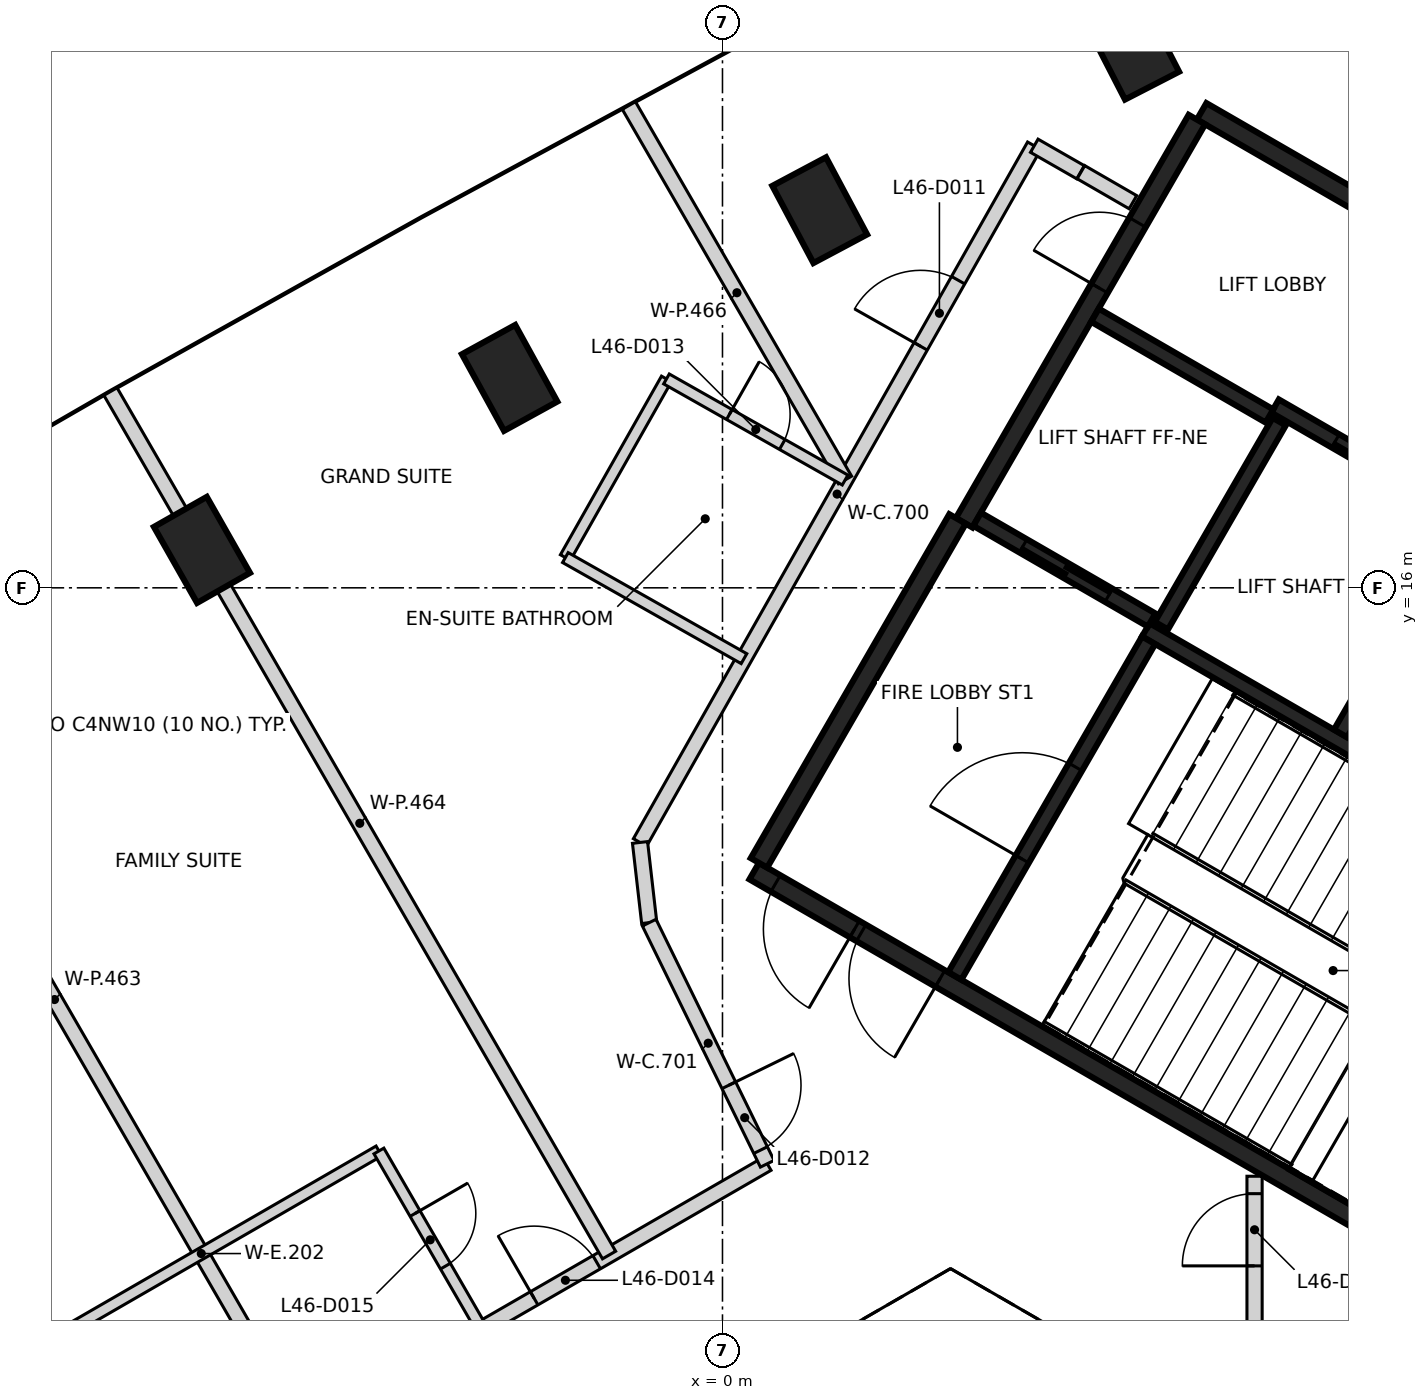
"""IFC4 building model, lengths in metres.
Left out: names, types, materials, properties, quantities, classifications, styles, units other than length and angle.
Written with IfcOpenShell. Run it as: python <this file> out.ifc"""

import sys

from ifc_helpers import new_model, si_unit, direction, frame, frame_2d, origin, origin_2d, place, context, subcontext, project, spatial, rectangle, extrude, element, fill, save


model = new_model("IFC4")
c1 = context("Model", 3, precision=1e-05, world=origin(), true_north=direction((0.0, 1.0)))
c2 = subcontext(c1, "Body", "Model", "MODEL_VIEW")
j1 = project(units=[si_unit("LENGTHUNIT", "METRE"), si_unit("PLANEANGLEUNIT", "RADIAN")], contexts=[c1])
p1 = place(None, origin())
s1 = spatial("IfcSite", under=j1, at=p1, CompositionType="ELEMENT")
p2 = place(p1, origin())
s2 = spatial("IfcBuilding", under=s1, at=p2, CompositionType="ELEMENT")
p3 = place(p2, frame((0.0, 0.0, 186.4)))
s3 = spatial("IfcBuildingStorey", under=s2, at=p3, CompositionType="ELEMENT", Elevation=186.4)
for number, where, z_axis, x_axis in (
    (1, (5.388, 23.118, -0.35), (0.0, 0.0, 1.0), (-0.458, 0.889, 0.0)),
    (2, (1.279, 20.968, -0.35), (0.0, 0.0, 1.0), (-0.47, 0.883, 0.0)),
    (3, (-2.8, 18.762, -0.35), (0.0, 0.0, 1.0), (-0.482, 0.876, 0.0)),
    (4, (-6.848, 16.499, -0.35), (0.0, 0.0, 1.0), (-0.494, 0.87, 0.0)),
):
    element("IfcColumn", number, at=place(p3, frame(where, z_axis=z_axis, x_axis=x_axis)), inside=s3, PredefinedType="COLUMN", context=c2, shape_type="SweptSolid", body=[
        extrude(rectangle(XDim=1.15, YDim=0.8, at=origin_2d()), origin(), (0.0, 0.0, 1.0), 3.6),
    ])
p4 = place(p3, frame((10.42, 6.498, 0.0), z_axis=(0.0, 0.0, 1.0), x_axis=(-0.866021906294, 0.500006057782, 0.0)))
e5 = element("IfcWall", 5, at=p4, inside=s3, PredefinedType="SHEAR", context=c2, shape_type="SweptSolid", body=[
    extrude(rectangle(XDim=11.55, YDim=0.25, at=frame_2d((5.775, 0.0))), origin(), (0.0, 0.0, 1.0), 3.25),
])
p5 = place(p4, frame((10.025, 0.0, 0.0)))
e6 = element("IfcOpeningElement", 6, at=p5, cuts=e5, PredefinedType="OPENING", context=c2, shape_type="SweptSolid", body=[
    extrude(rectangle(XDim=1.2, YDim=2.1, at=frame_2d((0.6, 1.05))), frame((0.0, 0.135, 0.0), z_axis=(0.0, -1.0, 0.0), x_axis=(1.0, 0.0, 0.0)), (0.0, 0.0, 1.0), 0.27),
])
p6 = place(p4, frame((8.725, 0.0, 0.0)))
e7 = element("IfcOpeningElement", 7, at=p6, cuts=e5, PredefinedType="OPENING", context=c2, shape_type="SweptSolid", body=[
    extrude(rectangle(XDim=1.2, YDim=2.1, at=frame_2d((0.6, 1.05))), frame((0.0, 0.135, 0.0), z_axis=(0.0, -1.0, 0.0), x_axis=(1.0, 0.0, 0.0)), (0.0, 0.0, 1.0), 0.27),
])
p7 = place(p3, frame((6.304, 22.269, 0.0), z_axis=(0.0, 0.0, 1.0), x_axis=(0.866022959057, -0.500004234368, 0.0)))
e8 = element("IfcWall", 8, at=p7, inside=s3, PredefinedType="SHEAR", context=c2, shape_type="SweptSolid", body=[
    extrude(rectangle(XDim=8.75, YDim=0.25, at=frame_2d((4.375, 0.0))), origin(), (0.0, 0.0, 1.0), 3.25),
])
p8 = place(p3, frame((3.179, 16.856, 0.0), z_axis=(0.0, 0.0, 1.0), x_axis=(0.500001955336, 0.866024274868, 0.0)))
e9 = element("IfcWall", 9, at=p8, inside=s3, PredefinedType="SHEAR", context=c2, shape_type="SweptSolid", body=[
    extrude(rectangle(XDim=6.125, YDim=0.25, at=frame_2d((3.062, 0.0))), origin(), (0.0, 0.0, 1.0), 3.25),
])
p9 = place(p8, frame((3.563, 0.0, 0.0)))
e10 = element("IfcOpeningElement", 10, at=p9, cuts=e9, PredefinedType="OPENING", context=c2, shape_type="SweptSolid", body=[
    extrude(rectangle(XDim=1.0, YDim=2.1, at=frame_2d((0.5, 1.05))), frame((0.0, 0.135, 0.0), z_axis=(0.0, -1.0, 0.0), x_axis=(1.0, 0.0, 0.0)), (0.0, 0.0, 1.0), 0.27),
])
p10 = place(p3, frame((0.48, 12.381, 0.0), z_axis=(0.0, 0.0, 1.0), x_axis=(0.49999885962, 0.866026062182, 0.0)))
e11 = element("IfcWall", 11, at=p10, inside=s3, PredefinedType="SHEAR", context=c2, shape_type="SweptSolid", body=[
    extrude(rectangle(XDim=5.225, YDim=0.25, at=frame_2d((2.612, 0.0))), origin(), (0.0, 0.0, 1.0), 3.25),
])
p11 = place(p3, frame((12.552, 15.342, 0.0), z_axis=(0.0, 0.0, 1.0), x_axis=(-0.866030299012, 0.499991521122, 0.0)))
e12 = element("IfcWall", 12, at=p11, inside=s3, PredefinedType="SHEAR", context=c2, shape_type="SweptSolid", body=[
    extrude(rectangle(XDim=6.1, YDim=0.2, at=frame_2d((3.05, 0.0))), origin(), (0.0, 0.0, 1.0), 3.25),
])
p12 = place(p11, frame((1.0, 0.0, 0.0)))
e13 = element("IfcOpeningElement", 13, at=p12, cuts=e12, PredefinedType="OPENING", context=c2, shape_type="SweptSolid", body=[
    extrude(rectangle(XDim=1.2, YDim=2.1, at=frame_2d((0.6, 1.05))), frame((0.0, 0.11, 0.0), z_axis=(0.0, -1.0, 0.0), x_axis=(1.0, 0.0, 0.0)), (0.0, 0.0, 1.0), 0.22),
])
p13 = place(p11, frame((3.982, 0.0, 0.0)))
e14 = element("IfcOpeningElement", 14, at=p13, cuts=e12, PredefinedType="OPENING", context=c2, shape_type="SweptSolid", body=[
    extrude(rectangle(XDim=1.2, YDim=2.1, at=frame_2d((0.6, 1.05))), frame((0.0, 0.11, 0.0), z_axis=(0.0, -1.0, 0.0), x_axis=(1.0, 0.0, 0.0)), (0.0, 0.0, 1.0), 0.22),
])
p14 = place(p3, frame((10.743, 12.46, 0.0), z_axis=(0.0, 0.0, 1.0), x_axis=(-0.866018848283, 0.500011354289, 0.0)))
e15 = element("IfcWall", 15, at=p14, inside=s3, PredefinedType="SHEAR", context=c2, shape_type="SweptSolid", body=[
    extrude(rectangle(XDim=5.974, YDim=0.2, at=frame_2d((2.987, 0.0))), origin(), (0.0, 0.0, 1.0), 3.25),
])
p15 = place(p3, frame((3.057, 10.895, 0.0), z_axis=(0.0, 0.0, 1.0), x_axis=(0.500027839223, 0.866009330205, 0.0)))
e16 = element("IfcWall", 16, at=p15, inside=s3, PredefinedType="SHEAR", context=c2, shape_type="SweptSolid", body=[
    extrude(rectangle(XDim=5.098, YDim=0.2, at=frame_2d((2.549, 0.0))), origin(), (0.0, 0.0, 1.0), 3.25),
])
p16 = place(p15, frame((1.774, 0.0, 0.0)))
e17 = element("IfcOpeningElement", 17, at=p16, cuts=e16, PredefinedType="OPENING", context=c2, shape_type="SweptSolid", body=[
    extrude(rectangle(XDim=1.4, YDim=2.1, at=frame_2d((0.7, 1.05))), frame((0.0, 0.11, 0.0), z_axis=(0.0, -1.0, 0.0), x_axis=(1.0, 0.0, 0.0)), (0.0, 0.0, 1.0), 0.22),
])
p17 = place(p3, frame((8.132, 14.084, 0.0), z_axis=(0.0, 0.0, 1.0), x_axis=(0.500030834389, 0.86600760081, 0.0)))
e18 = element("IfcWall", 18, at=p17, inside=s3, PredefinedType="SHEAR", context=c2, shape_type="SweptSolid", body=[
    extrude(rectangle(XDim=3.198, YDim=0.2, at=frame_2d((1.599, 0.0))), origin(), (0.0, 0.0, 1.0), 3.25),
])
p18 = place(p3, frame((7.324, 18.187, 0.0), z_axis=(0.0, 0.0, 1.0), x_axis=(-0.499967891604, -0.866043940782, 0.0)))
e19 = element("IfcWall", 19, at=p18, inside=s3, PredefinedType="SHEAR", context=c2, shape_type="SweptSolid", body=[
    extrude(rectangle(XDim=3.1, YDim=0.2, at=frame_2d((1.55, 0.0))), origin(), (0.0, 0.0, 1.0), 3.25),
])
p19 = place(p3, frame((5.646, 15.576, 0.0), z_axis=(0.0, 0.0, 1.0), x_axis=(-0.866018407898, 0.500012117035, 0.0)))
e20 = element("IfcWall", 20, at=p19, inside=s3, PredefinedType="SHEAR", context=c2, shape_type="SweptSolid", body=[
    extrude(rectangle(XDim=2.651, YDim=0.2, at=frame_2d((1.325, 0.0))), origin(), (0.0, 0.0, 1.0), 3.25),
])
p20 = place(p19, frame((0.652, 0.0, 0.0)))
e21 = element("IfcOpeningElement", 21, at=p20, cuts=e20, PredefinedType="OPENING", context=c2, shape_type="SweptSolid", body=[
    extrude(rectangle(XDim=1.3, YDim=2.1, at=frame_2d((0.65, 1.05))), frame((0.0, 0.11, 0.0), z_axis=(0.0, -1.0, 0.0), x_axis=(1.0, 0.0, 0.0)), (0.0, 0.0, 1.0), 0.22),
])
p21 = place(p3, frame((7.196, 18.26, 0.0), z_axis=(0.0, 0.0, 1.0), x_axis=(-0.866018407898, 0.500012117035, 0.0)))
e22 = element("IfcWall", 22, at=p21, inside=s3, PredefinedType="SHEAR", context=c2, shape_type="SweptSolid", body=[
    extrude(rectangle(XDim=2.651, YDim=0.2, at=frame_2d((1.325, 0.0))), origin(), (0.0, 0.0, 1.0), 3.25),
])
p22 = place(p3, frame((-10.652, 1.934, 0.0), z_axis=(0.0, 0.0, 1.0), x_axis=(0.866066882415, 0.499928150021, 0.0)))
e23 = element("IfcWall", 23, at=p22, inside=s3, PredefinedType="PARTITIONING", context=c2, shape_type="SweptSolid", body=[
    extrude(rectangle(XDim=12.98, YDim=0.2, at=frame_2d((6.49, 0.0))), origin(), (0.0, 0.0, 1.0), 3.25),
])
p23 = place(p22, frame((9.439, 0.0, 0.0)))
e24 = element("IfcOpeningElement", 24, at=p23, cuts=e23, PredefinedType="OPENING", context=c2, shape_type="SweptSolid", body=[
    extrude(rectangle(XDim=0.95, YDim=2.1, at=frame_2d((0.475, 1.05))), frame((0.0, 0.11, 0.0), z_axis=(0.0, -1.0, 0.0), x_axis=(1.0, 0.0, 0.0)), (0.0, 0.0, 1.0), 0.22),
])
p24 = place(p22, frame((0.229, 0.0, 0.0)))
e25 = element("IfcOpeningElement", 25, at=p24, cuts=e23, PredefinedType="OPENING", context=c2, shape_type="SweptSolid", body=[
    extrude(rectangle(XDim=0.95, YDim=2.1, at=frame_2d((0.475, 1.05))), frame((0.0, 0.11, 0.0), z_axis=(0.0, -1.0, 0.0), x_axis=(1.0, 0.0, 0.0)), (0.0, 0.0, 1.0), 0.22),
])
p25 = place(p3, frame((-1.085, 12.65, 0.0), z_axis=(0.0, 0.0, 1.0), x_axis=(0.49243456751, 0.870349468157, 0.0)))
e26 = element("IfcWall", 26, at=p25, inside=s3, PredefinedType="PARTITIONING", context=c2, shape_type="SweptSolid", body=[
    extrude(rectangle(XDim=10.531, YDim=0.2, at=frame_2d((5.266, 0.0))), origin(), (0.0, 0.0, 1.0), 3.25),
])
p26 = place(p25, frame((7.499, 0.0, 0.0)))
e27 = element("IfcOpeningElement", 27, at=p26, cuts=e26, PredefinedType="OPENING", context=c2, shape_type="SweptSolid", body=[
    extrude(rectangle(XDim=1.0, YDim=2.1, at=frame_2d((0.5, 1.05))), frame((0.0, 0.11, 0.0), z_axis=(0.0, -1.0, 0.0), x_axis=(1.0, 0.0, 0.0)), (0.0, 0.0, 1.0), 0.22),
])
p27 = place(p3, frame((-1.085, 12.65, 0.0), z_axis=(0.0, 0.0, 1.0), x_axis=(0.113812454263, -0.993502252264, 0.0)))
e28 = element("IfcWall", 28, at=p27, inside=s3, PredefinedType="PARTITIONING", context=c2, shape_type="SweptSolid", body=[
    extrude(rectangle(XDim=1.062, YDim=0.2, at=frame_2d((0.531, 0.0))), origin(), (0.0, 0.0, 1.0), 3.25),
])
p28 = place(p3, frame((-0.964, 11.595, 0.0), z_axis=(0.0, 0.0, 1.0), x_axis=(0.439787800928, -0.898101714816, 0.0)))
e29 = element("IfcWall", 29, at=p28, inside=s3, PredefinedType="PARTITIONING", context=c2, shape_type="SweptSolid", body=[
    extrude(rectangle(XDim=3.532, YDim=0.2, at=frame_2d((1.766, 0.0))), origin(), (0.0, 0.0, 1.0), 3.25),
])
p29 = place(p28, frame((2.382, 0.0, 0.0)))
e30 = element("IfcOpeningElement", 30, at=p29, cuts=e29, PredefinedType="OPENING", context=c2, shape_type="SweptSolid", body=[
    extrude(rectangle(XDim=0.95, YDim=2.1, at=frame_2d((0.475, 1.05))), frame((0.0, 0.11, 0.0), z_axis=(0.0, -1.0, 0.0), x_axis=(1.0, 0.0, 0.0)), (0.0, 0.0, 1.0), 0.22),
])
p30 = place(p3, frame((4.102, 21.816, 0.0), z_axis=(0.0, 0.0, 1.0), x_axis=(0.867664502326, -0.497150189986, 0.0)))
e31 = element("IfcWall", 31, at=p30, inside=s3, PredefinedType="PARTITIONING", context=c2, shape_type="SweptSolid", body=[
    extrude(rectangle(XDim=0.702, YDim=0.2, at=frame_2d((0.351, 0.0))), origin(), (0.0, 0.0, 1.0), 3.25),
])
p31 = place(p3, frame((4.716, 21.468, 0.0), z_axis=(0.0, 0.0, 1.0), x_axis=(0.865912682783, -0.500195187698, 0.0)))
e32 = element("IfcWall", 32, at=p31, inside=s3, PredefinedType="PARTITIONING", context=c2, shape_type="SweptSolid", body=[
    extrude(rectangle(XDim=0.79, YDim=0.2, at=frame_2d((0.395, 0.0))), origin(), (0.0, 0.0, 1.0), 3.25),
])
p32 = place(p3, frame((7.0, -4.966, 0.0), z_axis=(0.0, 0.0, 1.0), x_axis=(0.0, 1.0, 0.0)))
e33 = element("IfcWall", 33, at=p32, inside=s3, PredefinedType="PARTITIONING", context=c2, shape_type="SweptSolid", body=[
    extrude(rectangle(XDim=13.225, YDim=0.2, at=frame_2d((6.612, 0.0))), origin(), (0.0, 0.0, 1.0), 3.25),
])
p33 = place(p32, frame((2.835, 0.0, 0.0)))
e34 = element("IfcOpeningElement", 34, at=p33, cuts=e33, PredefinedType="OPENING", context=c2, shape_type="SweptSolid", body=[
    extrude(rectangle(XDim=1.0, YDim=2.1, at=frame_2d((0.5, 1.05))), frame((0.0, 0.11, 0.0), z_axis=(0.0, -1.0, 0.0), x_axis=(1.0, 0.0, 0.0)), (0.0, 0.0, 1.0), 0.22),
])
p34 = place(p32, frame((12.045, 0.0, 0.0)))
e35 = element("IfcOpeningElement", 35, at=p34, cuts=e33, PredefinedType="OPENING", context=c2, shape_type="SweptSolid", body=[
    extrude(rectangle(XDim=0.95, YDim=2.1, at=frame_2d((0.475, 1.05))), frame((0.0, 0.11, 0.0), z_axis=(0.0, -1.0, 0.0), x_axis=(1.0, 0.0, 0.0)), (0.0, 0.0, 1.0), 0.22),
])
p35 = place(p3, frame((-12.067, 16.263, 0.0), z_axis=(0.0, 0.0, 1.0), x_axis=(0.500016190239, -0.866016056144, 0.0)))
e36 = element("IfcWall", 36, at=p35, inside=s3, PredefinedType="PARTITIONING", context=c2, shape_type="SweptSolid", body=[
    extrude(rectangle(XDim=13.118, YDim=0.2, at=frame_2d((6.559, 0.0))), origin(), (0.0, 0.0, 1.0), 3.25),
])
p36 = place(p3, frame((-8.052, 18.582, 0.0), z_axis=(0.0, 0.0, 1.0), x_axis=(0.500046266189, -0.86599869034, 0.0)))
e37 = element("IfcWall", 37, at=p36, inside=s3, PredefinedType="PARTITIONING", context=c2, shape_type="SweptSolid", body=[
    extrude(rectangle(XDim=13.118, YDim=0.2, at=frame_2d((6.559, 0.0))), origin(), (0.0, 0.0, 1.0), 3.25),
])
p37 = place(p3, frame((-1.232, 22.345, 0.0), z_axis=(0.0, 0.0, 1.0), x_axis=(0.499942901263, -0.866058367246, 0.0)))
e38 = element("IfcWall", 38, at=p37, inside=s3, PredefinedType="PARTITIONING", context=c2, shape_type="SweptSolid", body=[
    extrude(rectangle(XDim=5.688, YDim=0.2, at=frame_2d((2.844, 0.0))), origin(), (0.0, 0.0, 1.0), 2.35),
])
p38 = place(p3, frame((-9.194, 5.892, 0.0), z_axis=(0.0, 0.0, 1.0), x_axis=(0.8659934935, 0.500055266161, 0.0)))
e39 = element("IfcWall", 39, at=p38, inside=s3, PredefinedType="PARTITIONING", context=c2, shape_type="SweptSolid", body=[
    extrude(rectangle(XDim=5.397, YDim=0.15, at=frame_2d((2.699, 0.0))), origin(), (0.0, 0.0, 1.0), 3.25),
])
p39 = place(p3, frame((-4.52, 8.591, 0.0), z_axis=(0.0, 0.0, 1.0), x_axis=(0.500048589285, -0.86599734893, 0.0)))
e40 = element("IfcWall", 40, at=p39, inside=s3, PredefinedType="PARTITIONING", context=c2, shape_type="SweptSolid", body=[
    extrude(rectangle(XDim=2.7, YDim=0.15, at=frame_2d((1.35, 0.0))), origin(), (0.0, 0.0, 1.0), 3.25),
])
p40 = place(p39, frame((0.95, 0.0, 0.0)))
e41 = element("IfcOpeningElement", 41, at=p40, cuts=e40, PredefinedType="OPENING", context=c2, shape_type="SweptSolid", body=[
    extrude(rectangle(XDim=0.8, YDim=2.1, at=frame_2d((0.4, 1.05))), frame((0.0, 0.085, 0.0), z_axis=(0.0, -1.0, 0.0), x_axis=(1.0, 0.0, 0.0)), (0.0, 0.0, 1.0), 0.17),
])
p41 = place(p3, frame((-2.067, 16.398, 0.0), z_axis=(0.0, 0.0, 1.0), x_axis=(0.492483230042, 0.870321933613, 0.0)))
e42 = element("IfcWall", 42, at=p41, inside=s3, PredefinedType="PARTITIONING", context=c2, shape_type="SweptSolid", body=[
    extrude(rectangle(XDim=2.7, YDim=0.15, at=frame_2d((1.35, 0.0))), origin(), (0.0, 0.0, 1.0), 3.25),
])
p42 = place(p3, frame((-2.067, 16.398, 0.0), z_axis=(0.0, 0.0, 1.0), x_axis=(0.870300002118, -0.492521985614, 0.0)))
e43 = element("IfcWall", 43, at=p42, inside=s3, PredefinedType="PARTITIONING", context=c2, shape_type="SweptSolid", body=[
    extrude(rectangle(XDim=2.7, YDim=0.15, at=frame_2d((1.35, 0.0))), origin(), (0.0, 0.0, 1.0), 3.25),
])
p43 = place(p3, frame((-0.737, 18.748, 0.0), z_axis=(0.0, 0.0, 1.0), x_axis=(0.870283179633, -0.492551710227, 0.0)))
e44 = element("IfcWall", 44, at=p43, inside=s3, PredefinedType="PARTITIONING", context=c2, shape_type="SweptSolid", body=[
    extrude(rectangle(XDim=2.7, YDim=0.15, at=frame_2d((1.35, 0.0))), origin(), (0.0, 0.0, 1.0), 3.25),
])
p44 = place(p43, frame((0.95, 0.0, 0.0)))
e45 = element("IfcOpeningElement", 45, at=p44, cuts=e44, PredefinedType="OPENING", context=c2, shape_type="SweptSolid", body=[
    extrude(rectangle(XDim=0.8, YDim=2.1, at=frame_2d((0.4, 1.05))), frame((0.0, 0.085, 0.0), z_axis=(0.0, -1.0, 0.0), x_axis=(1.0, 0.0, 0.0)), (0.0, 0.0, 1.0), 0.17),
])
p45 = place(p20, origin())
e46 = element("IfcDoor", 46, at=p45, inside=s3, OperationType="SLIDING_TO_LEFT", PredefinedType="DOOR", context=c2, shape_type="SweptSolid", body=[
    extrude(rectangle(XDim=1.3, YDim=2.1, at=frame_2d((0.65, 1.05))), frame((0.0, 0.025, 0.0), z_axis=(0.0, -1.0, 0.0), x_axis=(1.0, 0.0, 0.0)), (0.0, 0.0, 1.0), 0.05),
])
fill(e21, e46)
p46 = place(p13, origin())
e47 = element("IfcDoor", 47, at=p46, inside=s3, OperationType="DOUBLE_DOOR_SLIDING", PredefinedType="DOOR", context=c2, shape_type="SweptSolid", body=[
    extrude(rectangle(XDim=1.2, YDim=2.1, at=frame_2d((0.6, 1.05))), frame((0.0, 0.025, 0.0), z_axis=(0.0, -1.0, 0.0), x_axis=(1.0, 0.0, 0.0)), (0.0, 0.0, 1.0), 0.05),
])
fill(e14, e47)
p47 = place(p9, origin())
e48 = element("IfcDoor", 48, at=p47, inside=s3, OperationType="SINGLE_SWING_LEFT", PredefinedType="DOOR", context=c2, shape_type="SweptSolid", body=[
    extrude(rectangle(XDim=1.0, YDim=2.1, at=frame_2d((0.5, 1.05))), frame((0.0, 0.025, 0.0), z_axis=(0.0, -1.0, 0.0), x_axis=(1.0, 0.0, 0.0)), (0.0, 0.0, 1.0), 0.05),
])
fill(e10, e48)
p48 = place(p5, origin())
e49 = element("IfcDoor", 49, at=p48, inside=s3, OperationType="SINGLE_SWING_LEFT", PredefinedType="DOOR", context=c2, shape_type="SweptSolid", body=[
    extrude(rectangle(XDim=1.2, YDim=2.1, at=frame_2d((0.6, 1.05))), frame((0.0, 0.025, 0.0), z_axis=(0.0, -1.0, 0.0), x_axis=(1.0, 0.0, 0.0)), (0.0, 0.0, 1.0), 0.05),
])
fill(e6, e49)
p49 = place(p6, origin())
e50 = element("IfcDoor", 50, at=p49, inside=s3, OperationType="SINGLE_SWING_RIGHT", PredefinedType="DOOR", context=c2, shape_type="SweptSolid", body=[
    extrude(rectangle(XDim=1.2, YDim=2.1, at=frame_2d((0.6, 1.05))), frame((0.0, 0.025, 0.0), z_axis=(0.0, -1.0, 0.0), x_axis=(1.0, 0.0, 0.0)), (0.0, 0.0, 1.0), 0.05),
])
fill(e7, e50)
p50 = place(p16, origin())
e51 = element("IfcDoor", 51, at=p50, inside=s3, OperationType="SINGLE_SWING_LEFT", PredefinedType="DOOR", context=c2, shape_type="SweptSolid", body=[
    extrude(rectangle(XDim=1.4, YDim=2.1, at=frame_2d((0.7, 1.05))), frame((0.0, 0.025, 0.0), z_axis=(0.0, -1.0, 0.0), x_axis=(1.0, 0.0, 0.0)), (0.0, 0.0, 1.0), 0.05),
])
fill(e17, e51)
p51 = place(p34, frame((0.95, 0.0, 0.0), z_axis=(0.0, 0.0, 1.0), x_axis=(-1.0, 0.0, 0.0)))
e52 = element("IfcDoor", 52, at=p51, inside=s3, OperationType="SINGLE_SWING_LEFT", PredefinedType="DOOR", context=c2, shape_type="SweptSolid", body=[
    extrude(rectangle(XDim=0.95, YDim=2.1, at=frame_2d((0.475, 1.05))), frame((0.0, 0.025, 0.0), z_axis=(0.0, -1.0, 0.0), x_axis=(1.0, 0.0, 0.0)), (0.0, 0.0, 1.0), 0.05),
])
fill(e35, e52)
p52 = place(p26, frame((1.0, 0.0, 0.0), z_axis=(0.0, 0.0, 1.0), x_axis=(-1.0, 0.0, 0.0)))
e53 = element("IfcDoor", 53, at=p52, inside=s3, OperationType="SINGLE_SWING_LEFT", PredefinedType="DOOR", context=c2, shape_type="SweptSolid", body=[
    extrude(rectangle(XDim=1.0, YDim=2.1, at=frame_2d((0.5, 1.05))), frame((0.0, 0.025, 0.0), z_axis=(0.0, -1.0, 0.0), x_axis=(1.0, 0.0, 0.0)), (0.0, 0.0, 1.0), 0.05),
])
fill(e27, e53)
p53 = place(p29, frame((0.95, 0.0, 0.0), z_axis=(0.0, 0.0, 1.0), x_axis=(-1.0, 0.0, 0.0)))
e54 = element("IfcDoor", 54, at=p53, inside=s3, OperationType="SINGLE_SWING_LEFT", PredefinedType="DOOR", context=c2, shape_type="SweptSolid", body=[
    extrude(rectangle(XDim=0.95, YDim=2.1, at=frame_2d((0.475, 1.05))), frame((0.0, 0.025, 0.0), z_axis=(0.0, -1.0, 0.0), x_axis=(1.0, 0.0, 0.0)), (0.0, 0.0, 1.0), 0.05),
])
fill(e30, e54)
p54 = place(p44, frame((0.8, 0.0, 0.0), z_axis=(0.0, 0.0, 1.0), x_axis=(-1.0, 0.0, 0.0)))
e55 = element("IfcDoor", 55, at=p54, inside=s3, OperationType="SINGLE_SWING_LEFT", PredefinedType="DOOR", context=c2, shape_type="SweptSolid", body=[
    extrude(rectangle(XDim=0.8, YDim=2.1, at=frame_2d((0.4, 1.05))), frame((0.0, 0.025, 0.0), z_axis=(0.0, -1.0, 0.0), x_axis=(1.0, 0.0, 0.0)), (0.0, 0.0, 1.0), 0.05),
])
fill(e45, e55)
p55 = place(p23, origin())
e56 = element("IfcDoor", 56, at=p55, inside=s3, OperationType="SINGLE_SWING_LEFT", PredefinedType="DOOR", context=c2, shape_type="SweptSolid", body=[
    extrude(rectangle(XDim=0.95, YDim=2.1, at=frame_2d((0.475, 1.05))), frame((0.0, 0.025, 0.0), z_axis=(0.0, -1.0, 0.0), x_axis=(1.0, 0.0, 0.0)), (0.0, 0.0, 1.0), 0.05),
])
fill(e24, e56)
p56 = place(p40, frame((0.8, 0.0, 0.0), z_axis=(0.0, 0.0, 1.0), x_axis=(-1.0, 0.0, 0.0)))
e57 = element("IfcDoor", 57, at=p56, inside=s3, OperationType="SINGLE_SWING_LEFT", PredefinedType="DOOR", context=c2, shape_type="SweptSolid", body=[
    extrude(rectangle(XDim=0.8, YDim=2.1, at=frame_2d((0.4, 1.05))), frame((0.0, 0.025, 0.0), z_axis=(0.0, -1.0, 0.0), x_axis=(1.0, 0.0, 0.0)), (0.0, 0.0, 1.0), 0.05),
])
fill(e41, e57)
save(model, sys.argv[1])
